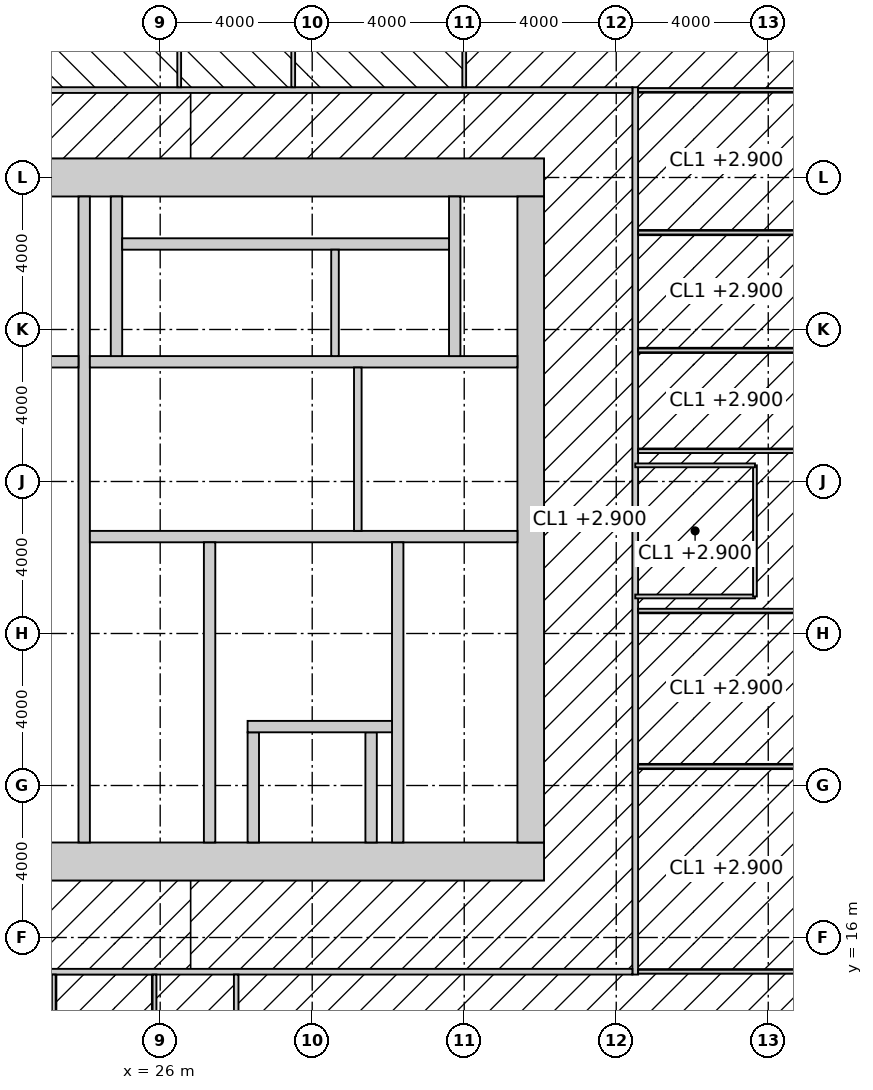
"""IFC4 building model, lengths in metres.
Left out: names, types, materials, properties, quantities, classifications, styles, units other than length and angle.
Written with IfcOpenShell. Run it as: python <this file> out.ifc"""

import sys

from ifc_helpers import new_model, si_unit, direction, frame, frame_2d, origin, place, context, subcontext, project, spatial, rectangle, extrude, element, fill, save


model = new_model("IFC4")
c1 = context("Model", 3, precision=1e-05, world=origin(), true_north=direction((0.0, 1.0)))
c2 = subcontext(c1, "Body", "Model", "MODEL_VIEW")
j1 = project(units=[si_unit("LENGTHUNIT", "METRE"), si_unit("PLANEANGLEUNIT", "RADIAN")], contexts=[c1])
p1 = place(None, origin())
s1 = spatial("IfcSite", under=j1, at=p1, CompositionType="ELEMENT")
p2 = place(p1, origin())
s2 = spatial("IfcBuilding", under=s1, at=p2, CompositionType="ELEMENT")
p3 = place(p2, frame((0.0, 0.0, 286.2)))
s3 = spatial("IfcBuildingStorey", under=s2, at=p3, CompositionType="ELEMENT", Elevation=286.2)
p4 = place(p3, frame((18.5, 18.0, -0.15), z_axis=(0.0, 0.0, 1.0), x_axis=(1.0, 0.0, 0.0)))
e1 = element("IfcWall", 1, at=p4, inside=s3, PredefinedType="SHEAR", context=c2, shape_type="SweptSolid", body=[
    extrude(rectangle(XDim=17.6, YDim=1.0, at=frame_2d((8.8, 0.0))), origin(), (0.0, 0.0, 1.0), 4.0),
])
p5 = place(p4, frame((3.45, 0.0, 0.15)))
e2 = element("IfcOpeningElement", 2, at=p5, cuts=e1, PredefinedType="OPENING", context=c2, shape_type="SweptSolid", body=[
    extrude(rectangle(XDim=1.5, YDim=2.4, at=frame_2d((0.75, 1.2))), frame((0.0, 0.51, 0.0), z_axis=(0.0, -1.0, 0.0), x_axis=(1.0, 0.0, 0.0)), (0.0, 0.0, 1.0), 1.02),
])
p6 = place(p3, frame((18.5, 36.0, -0.15), z_axis=(0.0, 0.0, 1.0), x_axis=(1.0, 0.0, 0.0)))
e3 = element("IfcWall", 3, at=p6, inside=s3, PredefinedType="SHEAR", context=c2, shape_type="SweptSolid", body=[
    extrude(rectangle(XDim=17.6, YDim=1.0, at=frame_2d((8.8, 0.0))), origin(), (0.0, 0.0, 1.0), 4.0),
])
p7 = place(p3, frame((35.75, 18.5, -0.15), z_axis=(0.0, 0.0, 1.0), x_axis=(0.0, 1.0, 0.0)))
e4 = element("IfcWall", 4, at=p7, inside=s3, PredefinedType="SHEAR", context=c2, shape_type="SweptSolid", body=[
    extrude(rectangle(XDim=17.0, YDim=0.7, at=frame_2d((8.5, 0.0))), origin(), (0.0, 0.0, 1.0), 4.0),
])
p8 = place(p7, frame((9.85, 0.0, 0.15)))
e5 = element("IfcOpeningElement", 5, at=p8, cuts=e4, PredefinedType="OPENING", context=c2, shape_type="SweptSolid", body=[
    extrude(rectangle(XDim=1.0, YDim=2.2, at=frame_2d((0.5, 1.1))), frame((0.0, 0.36, 0.0), z_axis=(0.0, -1.0, 0.0), x_axis=(1.0, 0.0, 0.0)), (0.0, 0.0, 1.0), 0.72),
])
p9 = place(p3, frame((24.0, 18.5, -0.15), z_axis=(0.0, 0.0, 1.0), x_axis=(0.0, 1.0, 0.0)))
e6 = element("IfcWall", 6, at=p9, inside=s3, PredefinedType="SHEAR", context=c2, shape_type="SweptSolid", body=[
    extrude(rectangle(XDim=17.0, YDim=0.3, at=frame_2d((8.5, 0.0))), origin(), (0.0, 0.0, 1.0), 4.0),
])
p10 = place(p9, frame((9.6, 0.0, 0.15)))
e7 = element("IfcOpeningElement", 7, at=p10, cuts=e6, PredefinedType="OPENING", context=c2, shape_type="SweptSolid", body=[
    extrude(rectangle(XDim=1.5, YDim=2.4, at=frame_2d((0.75, 1.2))), frame((0.0, 0.16, 0.0), z_axis=(0.0, -1.0, 0.0), x_axis=(1.0, 0.0, 0.0)), (0.0, 0.0, 1.0), 0.32),
])
p11 = place(p3, frame((24.15, 26.55, -0.15), z_axis=(0.0, 0.0, 1.0), x_axis=(1.0, 0.0, 0.0)))
e8 = element("IfcWall", 8, at=p11, inside=s3, PredefinedType="SHEAR", context=c2, shape_type="SweptSolid", body=[
    extrude(rectangle(XDim=11.25, YDim=0.3, at=frame_2d((5.625, 0.0))), origin(), (0.0, 0.0, 1.0), 4.0),
])
p12 = place(p11, frame((9.25, 0.0, 0.15)))
e9 = element("IfcOpeningElement", 9, at=p12, cuts=e8, PredefinedType="OPENING", context=c2, shape_type="SweptSolid", body=[
    extrude(rectangle(XDim=1.0, YDim=2.2, at=frame_2d((0.5, 1.1))), frame((0.0, 0.16, 0.0), z_axis=(0.0, -1.0, 0.0), x_axis=(1.0, 0.0, 0.0)), (0.0, 0.0, 1.0), 0.32),
])
p13 = place(p11, frame((4.9, 0.0, 0.15)))
e10 = element("IfcOpeningElement", 10, at=p13, cuts=e8, PredefinedType="OPENING", context=c2, shape_type="SweptSolid", body=[
    extrude(rectangle(XDim=1.5, YDim=2.4, at=frame_2d((0.75, 1.2))), frame((0.0, 0.16, 0.0), z_axis=(0.0, -1.0, 0.0), x_axis=(1.0, 0.0, 0.0)), (0.0, 0.0, 1.0), 0.32),
])
p14 = place(p3, frame((27.3, 18.5, -0.15), z_axis=(0.0, 0.0, 1.0), x_axis=(0.0, 1.0, 0.0)))
e11 = element("IfcWall", 11, at=p14, inside=s3, PredefinedType="SHEAR", context=c2, shape_type="SweptSolid", body=[
    extrude(rectangle(XDim=7.9, YDim=0.3, at=frame_2d((3.95, 0.0))), origin(), (0.0, 0.0, 1.0), 4.0),
])
p15 = place(p14, frame((6.4, 0.0, 0.15)))
e12 = element("IfcOpeningElement", 12, at=p15, cuts=e11, PredefinedType="OPENING", context=c2, shape_type="SweptSolid", body=[
    extrude(rectangle(XDim=1.0, YDim=2.2, at=frame_2d((0.5, 1.1))), frame((0.0, 0.16, 0.0), z_axis=(0.0, -1.0, 0.0), x_axis=(1.0, 0.0, 0.0)), (0.0, 0.0, 1.0), 0.32),
])
p16 = place(p3, frame((32.25, 18.5, -0.15), z_axis=(0.0, 0.0, 1.0), x_axis=(0.0, 1.0, 0.0)))
e13 = element("IfcWall", 13, at=p16, inside=s3, PredefinedType="SHEAR", context=c2, shape_type="SweptSolid", body=[
    extrude(rectangle(XDim=7.9, YDim=0.3, at=frame_2d((3.95, 0.0))), origin(), (0.0, 0.0, 1.0), 4.0),
])
for number, where, z_axis, x_axis in (
    (14, (28.45, 18.5, -0.15), (0.0, 0.0, 1.0), (0.0, 1.0, 0.0)),
    (15, (31.55, 18.5, -0.15), (0.0, 0.0, 1.0), (0.0, 1.0, 0.0)),
):
    element("IfcWall", number, at=place(p3, frame(where, z_axis=z_axis, x_axis=x_axis)), inside=s3, PredefinedType="SHEAR", context=c2, shape_type="SweptSolid", body=[
        extrude(rectangle(XDim=2.9, YDim=0.3, at=frame_2d((1.45, 0.0))), origin(), (0.0, 0.0, 1.0), 4.0),
    ])
p17 = place(p3, frame((28.3, 21.55, -0.15), z_axis=(0.0, 0.0, 1.0), x_axis=(1.0, 0.0, 0.0)))
e16 = element("IfcWall", 16, at=p17, inside=s3, PredefinedType="SHEAR", context=c2, shape_type="SweptSolid", body=[
    extrude(rectangle(XDim=3.8, YDim=0.3, at=frame_2d((1.9, 0.0))), origin(), (0.0, 0.0, 1.0), 4.0),
])
p18 = place(p17, frame((1.05, 0.0, 0.15)))
e17 = element("IfcOpeningElement", 17, at=p18, cuts=e16, PredefinedType="OPENING", context=c2, shape_type="SweptSolid", body=[
    extrude(rectangle(XDim=1.3, YDim=2.4, at=frame_2d((0.65, 1.2))), frame((0.0, 0.16, 0.0), z_axis=(0.0, -1.0, 0.0), x_axis=(1.0, 0.0, 0.0)), (0.0, 0.0, 1.0), 0.32),
])
p19 = place(p3, frame((24.15, 31.15, -0.15), z_axis=(0.0, 0.0, 1.0), x_axis=(1.0, 0.0, 0.0)))
e18 = element("IfcWall", 18, at=p19, inside=s3, PredefinedType="SHEAR", context=c2, shape_type="SweptSolid", body=[
    extrude(rectangle(XDim=11.25, YDim=0.3, at=frame_2d((5.625, 0.0))), origin(), (0.0, 0.0, 1.0), 4.0),
])
p20 = place(p19, frame((3.15, 0.0, 0.15)))
e19 = element("IfcOpeningElement", 19, at=p20, cuts=e18, PredefinedType="OPENING", context=c2, shape_type="SweptSolid", body=[
    extrude(rectangle(XDim=1.0, YDim=2.2, at=frame_2d((0.5, 1.1))), frame((0.0, 0.16, 0.0), z_axis=(0.0, -1.0, 0.0), x_axis=(1.0, 0.0, 0.0)), (0.0, 0.0, 1.0), 0.32),
])
p21 = place(p19, frame((7.25, 0.0, 0.15)))
e20 = element("IfcOpeningElement", 20, at=p21, cuts=e18, PredefinedType="OPENING", context=c2, shape_type="SweptSolid", body=[
    extrude(rectangle(XDim=1.4, YDim=2.4, at=frame_2d((0.7, 1.2))), frame((0.0, 0.16, 0.0), z_axis=(0.0, -1.0, 0.0), x_axis=(1.0, 0.0, 0.0)), (0.0, 0.0, 1.0), 0.32),
])
p22 = place(p3, frame((18.5, 31.15, -0.15), z_axis=(0.0, 0.0, 1.0), x_axis=(1.0, 0.0, 0.0)))
e21 = element("IfcWall", 21, at=p22, inside=s3, PredefinedType="SHEAR", context=c2, shape_type="SweptSolid", body=[
    extrude(rectangle(XDim=5.35, YDim=0.3, at=frame_2d((2.675, 0.0))), origin(), (0.0, 0.0, 1.0), 4.0),
])
p23 = place(p22, frame((3.4, 0.0, 0.15)))
e22 = element("IfcOpeningElement", 22, at=p23, cuts=e21, PredefinedType="OPENING", context=c2, shape_type="SweptSolid", body=[
    extrude(rectangle(XDim=1.0, YDim=2.2, at=frame_2d((0.5, 1.1))), frame((0.0, 0.16, 0.0), z_axis=(0.0, -1.0, 0.0), x_axis=(1.0, 0.0, 0.0)), (0.0, 0.0, 1.0), 0.32),
])
for number, where, z_axis, x_axis in (
    (23, (24.85, 31.3, -0.15), (0.0, 0.0, 1.0), (0.0, 1.0, 0.0)),
    (24, (33.75, 31.3, -0.15), (0.0, 0.0, 1.0), (0.0, 1.0, 0.0)),
):
    element("IfcWall", number, at=place(p3, frame(where, z_axis=z_axis, x_axis=x_axis)), inside=s3, PredefinedType="SHEAR", context=c2, shape_type="SweptSolid", body=[
        extrude(rectangle(XDim=4.2, YDim=0.3, at=frame_2d((2.1, 0.0))), origin(), (0.0, 0.0, 1.0), 4.0),
    ])
p24 = place(p3, frame((25.0, 34.25, -0.15), z_axis=(0.0, 0.0, 1.0), x_axis=(1.0, 0.0, 0.0)))
e25 = element("IfcWall", 25, at=p24, inside=s3, PredefinedType="SHEAR", context=c2, shape_type="SweptSolid", body=[
    extrude(rectangle(XDim=8.6, YDim=0.3, at=frame_2d((4.3, 0.0))), origin(), (0.0, 0.0, 1.0), 4.0),
])
p25 = place(p3, frame((30.6, 31.3, -0.15), z_axis=(0.0, 0.0, 1.0), x_axis=(0.0, 1.0, 0.0)))
e26 = element("IfcWall", 26, at=p25, inside=s3, PredefinedType="SOLIDWALL", context=c2, shape_type="SweptSolid", body=[
    extrude(rectangle(XDim=2.8, YDim=0.2, at=frame_2d((1.4, 0.0))), origin(), (0.0, 0.0, 1.0), 4.0),
])
p26 = place(p3, frame((31.2, 26.7, 0.0), z_axis=(0.0, 0.0, 1.0), x_axis=(0.0, 1.0, 0.0)))
e27 = element("IfcWall", 27, at=p26, inside=s3, PredefinedType="SOLIDWALL", context=c2, shape_type="SweptSolid", body=[
    extrude(rectangle(XDim=4.3, YDim=0.2, at=frame_2d((2.15, 0.0))), origin(), (0.0, 0.0, 1.0), 3.85),
])
p27 = place(p3, frame((38.5, 15.025, 0.0), z_axis=(0.0, 0.0, 1.0), x_axis=(0.0, 1.0, 0.0)))
e28 = element("IfcWall", 28, at=p27, inside=s3, PredefinedType="PARTITIONING", context=c2, shape_type="SweptSolid", body=[
    extrude(rectangle(XDim=23.35, YDim=0.15, at=frame_2d((11.675, 0.0))), origin(), (0.0, 0.0, 1.0), 3.85),
])
p28 = place(p27, frame((10.775, 0.0, 0.0)))
e29 = element("IfcOpeningElement", 29, at=p28, cuts=e28, PredefinedType="OPENING", context=c2, shape_type="SweptSolid", body=[
    extrude(rectangle(XDim=1.8, YDim=2.4, at=frame_2d((0.9, 1.2))), frame((0.0, 0.085, 0.0), z_axis=(0.0, -1.0, 0.0), x_axis=(1.0, 0.0, 0.0)), (0.0, 0.0, 1.0), 0.17),
])
p29 = place(p3, frame((15.775, 15.1, 0.0), z_axis=(0.0, 0.0, 1.0), x_axis=(1.0, 0.0, 0.0)))
e30 = element("IfcWall", 30, at=p29, inside=s3, PredefinedType="PARTITIONING", context=c2, shape_type="SweptSolid", body=[
    extrude(rectangle(XDim=22.65, YDim=0.15, at=frame_2d((11.325, 0.0))), origin(), (0.0, 0.0, 1.0), 3.85),
])
p30 = place(p3, frame((15.775, 38.3, 0.0), z_axis=(0.0, 0.0, 1.0), x_axis=(1.0, 0.0, 0.0)))
e31 = element("IfcWall", 31, at=p30, inside=s3, PredefinedType="PARTITIONING", context=c2, shape_type="SweptSolid", body=[
    extrude(rectangle(XDim=22.65, YDim=0.15, at=frame_2d((11.325, 0.0))), origin(), (0.0, 0.0, 1.0), 3.85),
])
p31 = place(p30, frame((7.975, 0.0, 0.0)))
e32 = element("IfcOpeningElement", 32, at=p31, cuts=e31, PredefinedType="OPENING", context=c2, shape_type="SweptSolid", body=[
    extrude(rectangle(XDim=0.9, YDim=2.1, at=frame_2d((0.45, 1.05))), frame((0.0, 0.085, 0.0), z_axis=(0.0, -1.0, 0.0), x_axis=(1.0, 0.0, 0.0)), (0.0, 0.0, 1.0), 0.17),
])
p32 = place(p30, frame((11.725, 0.0, 0.0)))
e33 = element("IfcOpeningElement", 33, at=p32, cuts=e31, PredefinedType="OPENING", context=c2, shape_type="SweptSolid", body=[
    extrude(rectangle(XDim=1.0, YDim=2.1, at=frame_2d((0.5, 1.05))), frame((0.0, 0.085, 0.0), z_axis=(0.0, -1.0, 0.0), x_axis=(1.0, 0.0, 0.0)), (0.0, 0.0, 1.0), 0.17),
])
p33 = place(p30, frame((15.575, 0.0, 0.0)))
e34 = element("IfcOpeningElement", 34, at=p33, cuts=e31, PredefinedType="OPENING", context=c2, shape_type="SweptSolid", body=[
    extrude(rectangle(XDim=0.9, YDim=2.1, at=frame_2d((0.45, 1.05))), frame((0.0, 0.085, 0.0), z_axis=(0.0, -1.0, 0.0), x_axis=(1.0, 0.0, 0.0)), (0.0, 0.0, 1.0), 0.17),
])
p34 = place(p3, frame((34.0, 38.375, 0.0), z_axis=(0.0, 0.0, 1.0), x_axis=(0.0, 1.0, 0.0)))
e35 = element("IfcWall", 35, at=p34, inside=s3, PredefinedType="PARTITIONING", context=c2, shape_type="SweptSolid", body=[
    extrude(rectangle(XDim=3.675, YDim=0.1, at=frame_2d((1.837, 0.0))), origin(), (0.0, 0.0, 1.0), 2.95),
])
for number, where, z_axis, x_axis in (
    (36, (26.5, 38.375, 0.0), (0.0, 0.0, 1.0), (0.0, 1.0, 0.0)),
    (37, (29.5, 38.375, 0.0), (0.0, 0.0, 1.0), (0.0, 1.0, 0.0)),
):
    element("IfcWall", number, at=place(p3, frame(where, z_axis=z_axis, x_axis=x_axis)), inside=s3, PredefinedType="PARTITIONING", context=c2, shape_type="SweptSolid", body=[
        extrude(rectangle(XDim=3.575, YDim=0.1, at=frame_2d((1.788, 0.0))), origin(), (0.0, 0.0, 1.0), 3.85),
    ])
p35 = place(p3, frame((28.0, 4.3, 0.0), z_axis=(0.0, 0.0, 1.0), x_axis=(0.0, 1.0, 0.0)))
e38 = element("IfcWall", 38, at=p35, inside=s3, PredefinedType="PARTITIONING", context=c2, shape_type="SweptSolid", body=[
    extrude(rectangle(XDim=10.725, YDim=0.12, at=frame_2d((5.362, 0.0))), origin(), (0.0, 0.0, 1.0), 3.85),
])
p36 = place(p3, frame((38.575, 15.1, 0.0), z_axis=(0.0, 0.0, 1.0), x_axis=(1.0, 0.0, 0.0)))
e39 = element("IfcWall", 39, at=p36, inside=s3, PredefinedType="PARTITIONING", context=c2, shape_type="SweptSolid", body=[
    extrude(rectangle(XDim=4.775, YDim=0.1, at=frame_2d((2.388, 0.0))), origin(), (0.0, 0.0, 1.0), 3.85),
])
p37 = place(p3, frame((38.575, 20.5, 0.0), z_axis=(0.0, 0.0, 1.0), x_axis=(1.0, 0.0, 0.0)))
e40 = element("IfcWall", 40, at=p37, inside=s3, PredefinedType="PARTITIONING", context=c2, shape_type="SweptSolid", body=[
    extrude(rectangle(XDim=4.675, YDim=0.1, at=frame_2d((2.337, 0.0))), origin(), (0.0, 0.0, 1.0), 3.85),
])
for number, where, z_axis, x_axis in (
    (41, (38.575, 24.6, 0.0), (0.0, 0.0, 1.0), (1.0, 0.0, 0.0)),
    (42, (38.575, 28.8, 0.0), (0.0, 0.0, 1.0), (1.0, 0.0, 0.0)),
):
    element("IfcWall", number, at=place(p3, frame(where, z_axis=z_axis, x_axis=x_axis)), inside=s3, PredefinedType="PARTITIONING", context=c2, shape_type="SweptSolid", body=[
        extrude(rectangle(XDim=4.775, YDim=0.1, at=frame_2d((2.388, 0.0))), origin(), (0.0, 0.0, 1.0), 3.85),
    ])
for number, where, z_axis, x_axis in (
    (43, (38.575, 31.45, 0.0), (0.0, 0.0, 1.0), (1.0, 0.0, 0.0)),
    (44, (38.575, 34.55, 0.0), (0.0, 0.0, 1.0), (1.0, 0.0, 0.0)),
):
    element("IfcWall", number, at=place(p3, frame(where, z_axis=z_axis, x_axis=x_axis)), inside=s3, PredefinedType="PARTITIONING", context=c2, shape_type="SweptSolid", body=[
        extrude(rectangle(XDim=4.675, YDim=0.1, at=frame_2d((2.337, 0.0))), origin(), (0.0, 0.0, 1.0), 3.85),
    ])
p38 = place(p3, frame((38.575, 38.3, 0.0), z_axis=(0.0, 0.0, 1.0), x_axis=(1.0, 0.0, 0.0)))
e45 = element("IfcWall", 45, at=p38, inside=s3, PredefinedType="PARTITIONING", context=c2, shape_type="SweptSolid", body=[
    extrude(rectangle(XDim=4.775, YDim=0.1, at=frame_2d((2.388, 0.0))), origin(), (0.0, 0.0, 1.0), 3.85),
])
p39 = place(p3, frame((23.2, 11.55, 0.0), z_axis=(0.0, 0.0, 1.0), x_axis=(0.0, 1.0, 0.0)))
e46 = element("IfcWall", 46, at=p39, inside=s3, PredefinedType="PARTITIONING", context=c2, shape_type="SweptSolid", body=[
    extrude(rectangle(XDim=3.475, YDim=0.1, at=frame_2d((1.737, 0.0))), origin(), (0.0, 0.0, 1.0), 3.85),
])
p40 = place(p3, frame((25.85, 11.55, 0.0), z_axis=(0.0, 0.0, 1.0), x_axis=(0.0, 1.0, 0.0)))
e47 = element("IfcWall", 47, at=p40, inside=s3, PredefinedType="PARTITIONING", context=c2, shape_type="SweptSolid", body=[
    extrude(rectangle(XDim=3.475, YDim=0.1, at=frame_2d((1.737, 0.0))), origin(), (0.0, 0.0, 1.0), 2.95),
])
p41 = place(p3, frame((38.5, 24.975, 0.0), z_axis=(0.0, 0.0, 1.0), x_axis=(1.0, 0.0, 0.0)))
e48 = element("IfcWall", 48, at=p41, inside=s3, PredefinedType="PARTITIONING", context=c2, shape_type="SweptSolid", body=[
    extrude(rectangle(XDim=3.15, YDim=0.1, at=frame_2d((1.575, 0.0))), origin(), (0.0, 0.0, 1.0), 3.85),
])
p42 = place(p3, frame((41.65, 24.975, 0.0), z_axis=(0.0, 0.0, 1.0), x_axis=(0.0, 1.0, 0.0)))
e49 = element("IfcWall", 49, at=p42, inside=s3, PredefinedType="PARTITIONING", context=c2, shape_type="SweptSolid", body=[
    extrude(rectangle(XDim=3.45, YDim=0.1, at=frame_2d((1.725, 0.0))), origin(), (0.0, 0.0, 1.0), 3.85),
])
p43 = place(p42, frame((1.225, 0.0, 0.0)))
e50 = element("IfcOpeningElement", 50, at=p43, cuts=e49, PredefinedType="OPENING", context=c2, shape_type="SweptSolid", body=[
    extrude(rectangle(XDim=1.0, YDim=2.2, at=frame_2d((0.5, 1.1))), frame((0.0, 0.06, 0.0), z_axis=(0.0, -1.0, 0.0), x_axis=(1.0, 0.0, 0.0)), (0.0, 0.0, 1.0), 0.12),
])
p44 = place(p3, frame((41.65, 28.425, 0.0), z_axis=(0.0, 0.0, 1.0), x_axis=(-1.0, 0.0, 0.0)))
e51 = element("IfcWall", 51, at=p44, inside=s3, PredefinedType="PARTITIONING", context=c2, shape_type="SweptSolid", body=[
    extrude(rectangle(XDim=3.15, YDim=0.1, at=frame_2d((1.575, 0.0))), origin(), (0.0, 0.0, 1.0), 3.85),
])
p45 = place(p15, origin())
e52 = element("IfcDoor", 52, at=p45, inside=s3, OperationType="SINGLE_SWING_RIGHT", PredefinedType="DOOR", context=c2, shape_type="SweptSolid", body=[
    extrude(rectangle(XDim=1.0, YDim=2.2, at=frame_2d((0.5, 1.1))), frame((0.0, 0.025, 0.0), z_axis=(0.0, -1.0, 0.0), x_axis=(1.0, 0.0, 0.0)), (0.0, 0.0, 1.0), 0.05),
])
fill(e12, e52)
p46 = place(p12, frame((1.0, 0.0, 0.0), z_axis=(0.0, 0.0, 1.0), x_axis=(-1.0, 0.0, 0.0)))
e53 = element("IfcDoor", 53, at=p46, inside=s3, OperationType="SINGLE_SWING_RIGHT", PredefinedType="DOOR", context=c2, shape_type="SweptSolid", body=[
    extrude(rectangle(XDim=1.0, YDim=2.2, at=frame_2d((0.5, 1.1))), frame((0.0, 0.025, 0.0), z_axis=(0.0, -1.0, 0.0), x_axis=(1.0, 0.0, 0.0)), (0.0, 0.0, 1.0), 0.05),
])
fill(e9, e53)
p47 = place(p8, origin())
e54 = element("IfcDoor", 54, at=p47, inside=s3, OperationType="SINGLE_SWING_RIGHT", PredefinedType="DOOR", context=c2, shape_type="SweptSolid", body=[
    extrude(rectangle(XDim=1.0, YDim=2.2, at=frame_2d((0.5, 1.1))), frame((0.0, 0.025, 0.0), z_axis=(0.0, -1.0, 0.0), x_axis=(1.0, 0.0, 0.0)), (0.0, 0.0, 1.0), 0.05),
])
fill(e5, e54)
p48 = place(p13, origin())
e55 = element("IfcDoor", 55, at=p48, inside=s3, OperationType="DOUBLE_DOOR_DOUBLE_SWING", PredefinedType="DOOR", context=c2, shape_type="SweptSolid", body=[
    extrude(rectangle(XDim=1.5, YDim=2.4, at=frame_2d((0.75, 1.2))), frame((0.0, 0.025, 0.0), z_axis=(0.0, -1.0, 0.0), x_axis=(1.0, 0.0, 0.0)), (0.0, 0.0, 1.0), 0.05),
])
fill(e10, e55)
p49 = place(p10, origin())
e56 = element("IfcDoor", 56, at=p49, inside=s3, OperationType="DOUBLE_DOOR_DOUBLE_SWING", PredefinedType="DOOR", context=c2, shape_type="SweptSolid", body=[
    extrude(rectangle(XDim=1.5, YDim=2.4, at=frame_2d((0.75, 1.2))), frame((0.0, 0.025, 0.0), z_axis=(0.0, -1.0, 0.0), x_axis=(1.0, 0.0, 0.0)), (0.0, 0.0, 1.0), 0.05),
])
fill(e7, e56)
p50 = place(p20, origin())
e57 = element("IfcDoor", 57, at=p50, inside=s3, OperationType="SINGLE_SWING_LEFT", PredefinedType="DOOR", context=c2, shape_type="SweptSolid", body=[
    extrude(rectangle(XDim=1.0, YDim=2.2, at=frame_2d((0.5, 1.1))), frame((0.0, 0.025, 0.0), z_axis=(0.0, -1.0, 0.0), x_axis=(1.0, 0.0, 0.0)), (0.0, 0.0, 1.0), 0.05),
])
fill(e19, e57)
p51 = place(p5, origin())
e58 = element("IfcDoor", 58, at=p51, inside=s3, OperationType="DOUBLE_DOOR_DOUBLE_SWING", PredefinedType="DOOR", context=c2, shape_type="SweptSolid", body=[
    extrude(rectangle(XDim=1.5, YDim=2.4, at=frame_2d((0.75, 1.2))), frame((0.0, 0.025, 0.0), z_axis=(0.0, -1.0, 0.0), x_axis=(1.0, 0.0, 0.0)), (0.0, 0.0, 1.0), 0.05),
])
fill(e2, e58)
p52 = place(p31, origin())
e59 = element("IfcDoor", 59, at=p52, inside=s3, OperationType="SINGLE_SWING_LEFT", PredefinedType="DOOR", context=c2, shape_type="SweptSolid", body=[
    extrude(rectangle(XDim=0.9, YDim=2.1, at=frame_2d((0.45, 1.05))), frame((0.0, 0.025, 0.0), z_axis=(0.0, -1.0, 0.0), x_axis=(1.0, 0.0, 0.0)), (0.0, 0.0, 1.0), 0.05),
])
fill(e32, e59)
p53 = place(p32, origin())
e60 = element("IfcDoor", 60, at=p53, inside=s3, OperationType="SLIDING_TO_LEFT", PredefinedType="DOOR", context=c2, shape_type="SweptSolid", body=[
    extrude(rectangle(XDim=1.0, YDim=2.1, at=frame_2d((0.5, 1.05))), frame((0.0, 0.025, 0.0), z_axis=(0.0, -1.0, 0.0), x_axis=(1.0, 0.0, 0.0)), (0.0, 0.0, 1.0), 0.05),
])
fill(e33, e60)
p54 = place(p33, origin())
e61 = element("IfcDoor", 61, at=p54, inside=s3, OperationType="SINGLE_SWING_LEFT", PredefinedType="DOOR", context=c2, shape_type="SweptSolid", body=[
    extrude(rectangle(XDim=0.9, YDim=2.1, at=frame_2d((0.45, 1.05))), frame((0.0, 0.025, 0.0), z_axis=(0.0, -1.0, 0.0), x_axis=(1.0, 0.0, 0.0)), (0.0, 0.0, 1.0), 0.05),
])
fill(e34, e61)
p55 = place(p28, origin())
e62 = element("IfcDoor", 62, at=p55, inside=s3, OperationType="DOUBLE_DOOR_DOUBLE_SWING", PredefinedType="DOOR", context=c2, shape_type="SweptSolid", body=[
    extrude(rectangle(XDim=1.8, YDim=2.4, at=frame_2d((0.9, 1.2))), frame((0.0, 0.025, 0.0), z_axis=(0.0, -1.0, 0.0), x_axis=(1.0, 0.0, 0.0)), (0.0, 0.0, 1.0), 0.05),
])
fill(e29, e62)
p56 = place(p43, origin())
e63 = element("IfcDoor", 63, at=p56, inside=s3, OperationType="SINGLE_SWING_RIGHT", PredefinedType="DOOR", context=c2, shape_type="SweptSolid", body=[
    extrude(rectangle(XDim=1.0, YDim=2.2, at=frame_2d((0.5, 1.1))), frame((0.0, 0.025, 0.0), z_axis=(0.0, -1.0, 0.0), x_axis=(1.0, 0.0, 0.0)), (0.0, 0.0, 1.0), 0.05),
])
fill(e50, e63)
p57 = place(p18, origin())
e64 = element("IfcDoor", 64, at=p57, inside=s3, OperationType="DOUBLE_DOOR_SLIDING", PredefinedType="DOOR", context=c2, shape_type="SweptSolid", body=[
    extrude(rectangle(XDim=1.3, YDim=2.4, at=frame_2d((0.65, 1.2))), frame((0.0, 0.025, 0.0), z_axis=(0.0, -1.0, 0.0), x_axis=(1.0, 0.0, 0.0)), (0.0, 0.0, 1.0), 0.05),
])
fill(e17, e64)
p58 = place(p21, origin())
e65 = element("IfcDoor", 65, at=p58, inside=s3, OperationType="DOUBLE_DOOR_SLIDING", PredefinedType="DOOR", context=c2, shape_type="SweptSolid", body=[
    extrude(rectangle(XDim=1.4, YDim=2.4, at=frame_2d((0.7, 1.2))), frame((0.0, 0.025, 0.0), z_axis=(0.0, -1.0, 0.0), x_axis=(1.0, 0.0, 0.0)), (0.0, 0.0, 1.0), 0.05),
])
fill(e20, e65)
save(model, sys.argv[1])
